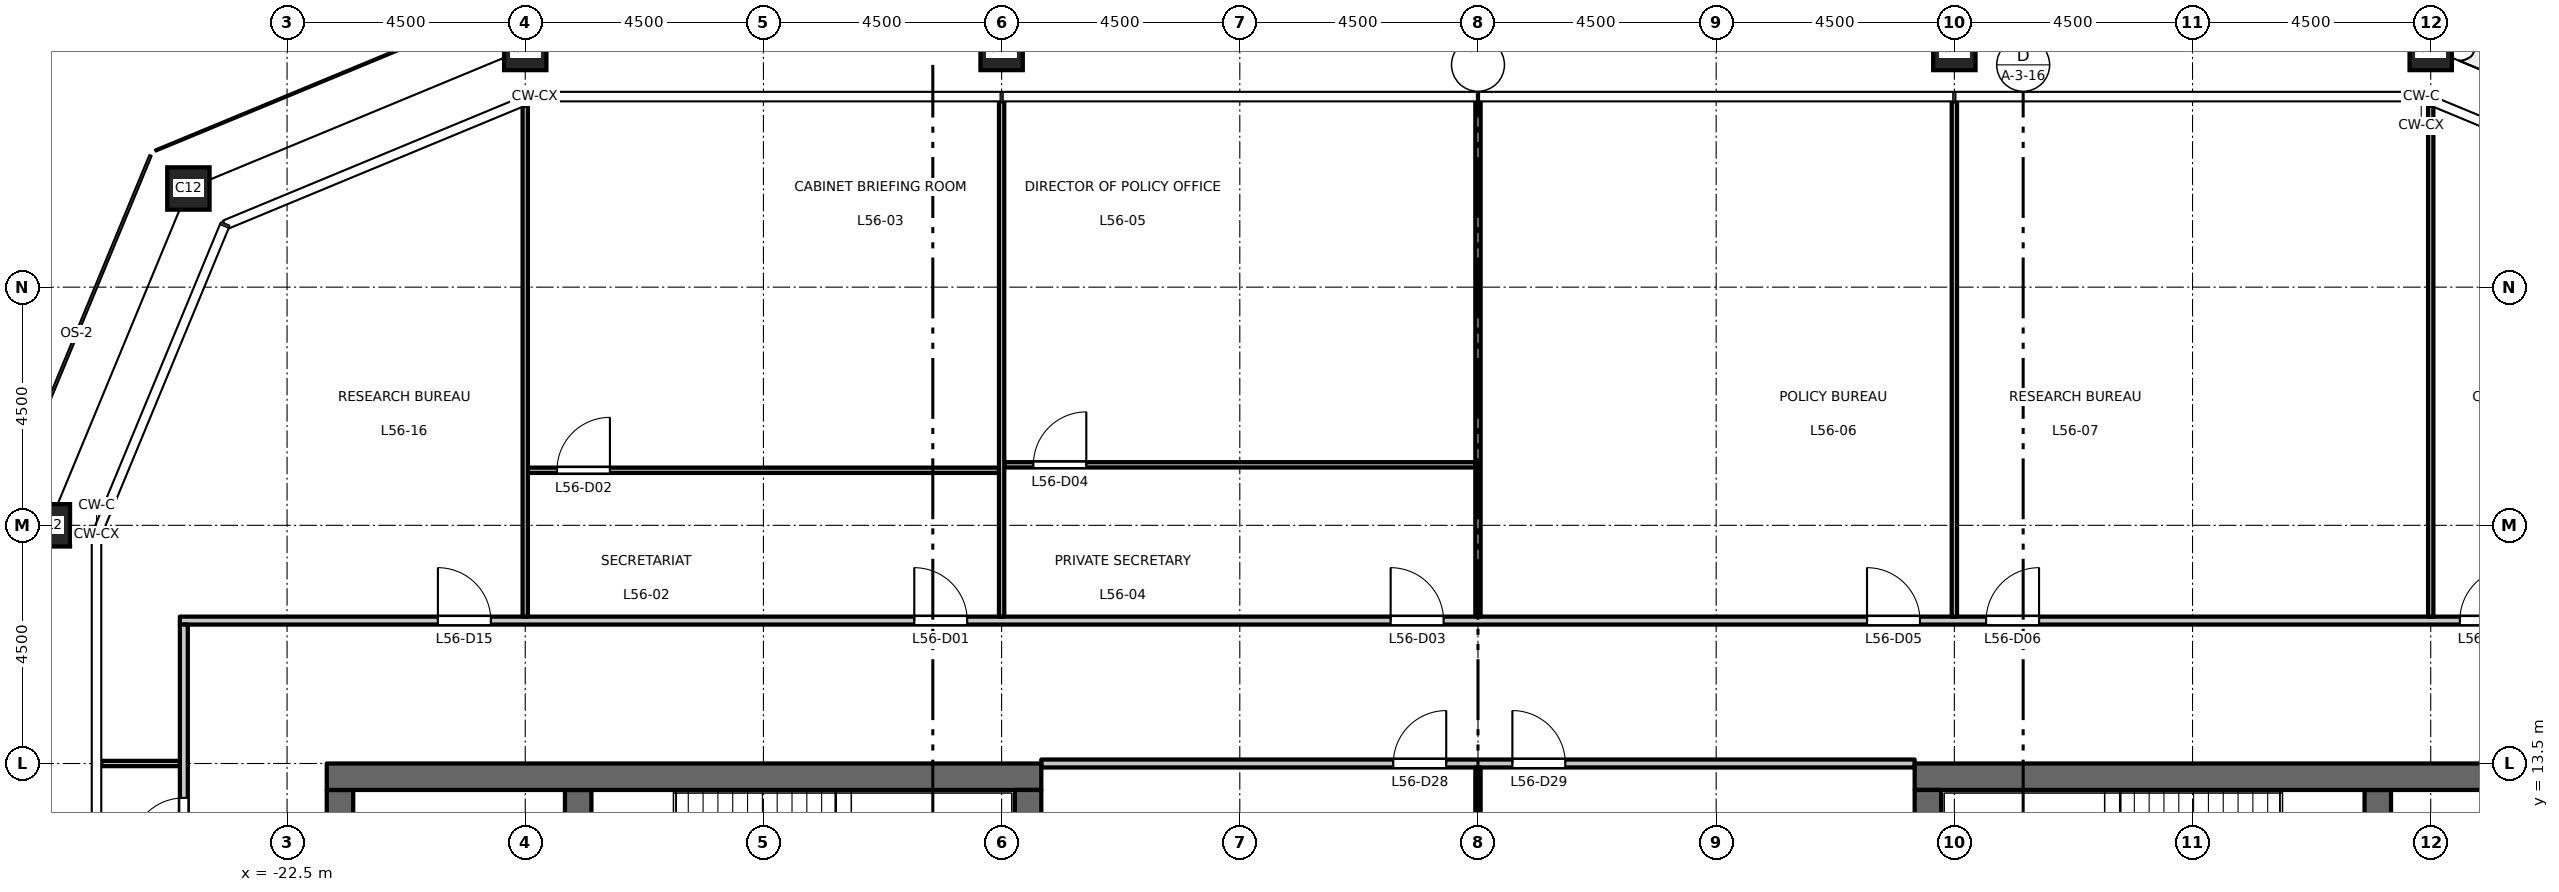
"""IFC4 building model, lengths in metres.
Left out: names, types, materials, properties, quantities, classifications, styles, units other than length and angle.
Written with IfcOpenShell. Run it as: python <this file> out.ifc"""

import sys

from ifc_helpers import new_model, si_unit, direction, frame, frame_2d, origin, origin_2d, place, context, subcontext, project, spatial, rectangle, hollow_rectangle, extrude, element, fill, save


model = new_model("IFC4")
c1 = context("Model", 3, precision=1e-05, world=origin(), true_north=direction((0.0, 1.0)))
c2 = subcontext(c1, "Body", "Model", "MODEL_VIEW")
j1 = project(units=[si_unit("LENGTHUNIT", "METRE"), si_unit("PLANEANGLEUNIT", "RADIAN")], contexts=[c1])
p1 = place(None, origin())
s1 = spatial("IfcSite", under=j1, at=p1, CompositionType="ELEMENT")
p2 = place(p1, origin())
s2 = spatial("IfcBuilding", under=s1, at=p2, CompositionType="ELEMENT")
p3 = place(p2, frame((0.0, 0.0, 260.2)))
s3 = spatial("IfcBuildingStorey", under=s2, at=p3, CompositionType="ELEMENT", Elevation=260.2)
for number, where, z_axis, x_axis in (
    (1, (18.0, 27.0, 0.0), (0.0, 0.0, 1.0), (1.0, 0.0, 0.0)),
    (2, (9.0, 27.0, 0.0), (0.0, 0.0, 1.0), (1.0, 0.0, 0.0)),
    (3, (0.0, 27.0, 0.0), (0.0, 0.0, 1.0), (1.0, 0.0, 0.0)),
    (4, (-9.0, 27.0, 0.0), (0.0, 0.0, 1.0), (1.0, 0.0, 0.0)),
    (5, (-18.0, 27.0, 0.0), (0.0, 0.0, 1.0), (1.0, 0.0, 0.0)),
    (6, (-24.364, 24.364, 0.0), (0.0, 0.0, 1.0), (1.0, 0.0, 0.0)),
    (7, (-27.0, 18.0, 0.0), (0.0, 0.0, 1.0), (1.0, 0.0, 0.0)),
):
    element("IfcColumn", number, at=place(p3, frame(where, z_axis=z_axis, x_axis=x_axis)), inside=s3, PredefinedType="COLUMN", context=c2, shape_type="SweptSolid", body=[
        extrude(hollow_rectangle(XDim=0.8, YDim=0.8, WallThickness=0.045, at=origin_2d()), origin(), (0.0, 0.0, 1.0), 4.5),
    ])
p4 = place(p3, frame((-21.5, -13.0, 0.0), z_axis=(0.0, 0.0, 1.0), x_axis=(0.0, 1.0, 0.0)))
e8 = element("IfcWall", 8, at=p4, inside=s3, PredefinedType="SHEAR", context=c2, shape_type="SweptSolid", body=[
    extrude(rectangle(XDim=26.0, YDim=0.5, at=frame_2d((13.0, 0.0))), origin(), (0.0, 0.0, 1.0), 4.35),
])
p5 = place(p4, frame((16.825, 0.0, 0.0)))
e9 = element("IfcOpeningElement", 9, at=p5, cuts=e8, PredefinedType="OPENING", context=c2, shape_type="SweptSolid", body=[
    extrude(rectangle(XDim=1.8, YDim=2.1, at=frame_2d((0.9, 1.05))), frame((0.0, 0.26, 0.0), z_axis=(0.0, -1.0, 0.0), x_axis=(1.0, 0.0, 0.0)), (0.0, 0.0, 1.0), 0.52),
])
p6 = place(p4, frame((7.375, 0.0, 0.0)))
e10 = element("IfcOpeningElement", 10, at=p6, cuts=e8, PredefinedType="OPENING", context=c2, shape_type="SweptSolid", body=[
    extrude(rectangle(XDim=1.8, YDim=2.1, at=frame_2d((0.9, 1.05))), frame((0.0, 0.26, 0.0), z_axis=(0.0, -1.0, 0.0), x_axis=(1.0, 0.0, 0.0)), (0.0, 0.0, 1.0), 0.52),
])
p7 = place(p3, frame((-17.0, 6.425, 0.0), z_axis=(0.0, 0.0, 1.0), x_axis=(0.0, 1.0, 0.0)))
e11 = element("IfcWall", 11, at=p7, inside=s3, PredefinedType="SHEAR", context=c2, shape_type="SweptSolid", body=[
    extrude(rectangle(XDim=6.575, YDim=0.5, at=frame_2d((3.288, 0.0))), origin(), (0.0, 0.0, 1.0), 4.35),
])
p8 = place(p3, frame((-8.25, 13.25, 0.0), z_axis=(0.0, 0.0, 1.0), x_axis=(-1.0, 0.0, 0.0)))
e12 = element("IfcWall", 12, at=p8, inside=s3, PredefinedType="SHEAR", context=c2, shape_type="SweptSolid", body=[
    extrude(rectangle(XDim=13.5, YDim=0.5, at=frame_2d((6.75, 0.0))), origin(), (0.0, 0.0, 1.0), 4.35),
])
p9 = place(p3, frame((-8.5, -13.0, 0.0), z_axis=(0.0, 0.0, 1.0), x_axis=(0.0, 1.0, 0.0)))
e13 = element("IfcWall", 13, at=p9, inside=s3, PredefinedType="SHEAR", context=c2, shape_type="SweptSolid", body=[
    extrude(rectangle(XDim=26.0, YDim=0.5, at=frame_2d((13.0, 0.0))), origin(), (0.0, 0.0, 1.0), 4.35),
])
p10 = place(p3, frame((17.0, 6.425, 0.0), z_axis=(0.0, 0.0, 1.0), x_axis=(0.0, 1.0, 0.0)))
e14 = element("IfcWall", 14, at=p10, inside=s3, PredefinedType="SHEAR", context=c2, shape_type="SweptSolid", body=[
    extrude(rectangle(XDim=6.575, YDim=0.5, at=frame_2d((3.288, 0.0))), origin(), (0.0, 0.0, 1.0), 4.35),
])
p11 = place(p3, frame((8.25, 13.25, 0.0), z_axis=(0.0, 0.0, 1.0), x_axis=(1.0, 0.0, 0.0)))
e15 = element("IfcWall", 15, at=p11, inside=s3, PredefinedType="SHEAR", context=c2, shape_type="SweptSolid", body=[
    extrude(rectangle(XDim=13.5, YDim=0.5, at=frame_2d((6.75, 0.0))), origin(), (0.0, 0.0, 1.0), 4.35),
])
p12 = place(p3, frame((8.5, -13.0, 0.0), z_axis=(0.0, 0.0, 1.0), x_axis=(0.0, 1.0, 0.0)))
e16 = element("IfcWall", 16, at=p12, inside=s3, PredefinedType="SHEAR", context=c2, shape_type="SweptSolid", body=[
    extrude(rectangle(XDim=26.0, YDim=0.5, at=frame_2d((13.0, 0.0))), origin(), (0.0, 0.0, 1.0), 4.35),
])
p13 = place(p3, frame((-26.01, 13.5, 0.0), z_axis=(0.0, 0.0, 1.0), x_axis=(1.0, 0.0, 0.0)))
e17 = element("IfcWall", 17, at=p13, inside=s3, PredefinedType="PARTITIONING", context=c2, shape_type="SweptSolid", body=[
    extrude(rectangle(XDim=1.485, YDim=0.1, at=frame_2d((0.743, 0.0))), origin(), (0.0, 0.0, 1.0), 4.35),
])
p14 = place(p3, frame((-8.25, 13.5, 0.0), z_axis=(0.0, 0.0, 1.0), x_axis=(1.0, 0.0, 0.0)))
e18 = element("IfcWall", 18, at=p14, inside=s3, PredefinedType="PARTITIONING", context=c2, shape_type="SweptSolid", body=[
    extrude(rectangle(XDim=16.5, YDim=0.15, at=frame_2d((8.25, 0.0))), origin(), (0.0, 0.0, 1.0), 4.35),
])
p15 = place(p14, frame((6.65, 0.0, 0.0)))
e19 = element("IfcOpeningElement", 19, at=p15, cuts=e18, PredefinedType="OPENING", context=c2, shape_type="SweptSolid", body=[
    extrude(rectangle(XDim=1.0, YDim=2.1, at=frame_2d((0.5, 1.05))), frame((0.0, 0.085, 0.0), z_axis=(0.0, -1.0, 0.0), x_axis=(1.0, 0.0, 0.0)), (0.0, 0.0, 1.0), 0.17),
])
p16 = place(p14, frame((8.9, 0.0, 0.0)))
e20 = element("IfcOpeningElement", 20, at=p16, cuts=e18, PredefinedType="OPENING", context=c2, shape_type="SweptSolid", body=[
    extrude(rectangle(XDim=1.0, YDim=2.1, at=frame_2d((0.5, 1.05))), frame((0.0, 0.085, 0.0), z_axis=(0.0, -1.0, 0.0), x_axis=(1.0, 0.0, 0.0)), (0.0, 0.0, 1.0), 0.17),
])
p17 = place(p3, frame((-24.525, 16.2, 0.0), z_axis=(0.0, 0.0, 1.0), x_axis=(1.0, 0.0, 0.0)))
e21 = element("IfcWall", 21, at=p17, inside=s3, PredefinedType="PARTITIONING", context=c2, shape_type="SweptSolid", body=[
    extrude(rectangle(XDim=49.05, YDim=0.15, at=frame_2d((24.525, 0.0))), origin(), (0.0, 0.0, 1.0), 4.35),
])
p18 = place(p17, frame((13.875, 0.0, 0.0)))
e22 = element("IfcOpeningElement", 22, at=p18, cuts=e21, PredefinedType="OPENING", context=c2, shape_type="SweptSolid", body=[
    extrude(rectangle(XDim=1.0, YDim=2.1, at=frame_2d((0.5, 1.05))), frame((0.0, 0.085, 0.0), z_axis=(0.0, -1.0, 0.0), x_axis=(1.0, 0.0, 0.0)), (0.0, 0.0, 1.0), 0.17),
])
p19 = place(p17, frame((22.875, 0.0, 0.0)))
e23 = element("IfcOpeningElement", 23, at=p19, cuts=e21, PredefinedType="OPENING", context=c2, shape_type="SweptSolid", body=[
    extrude(rectangle(XDim=1.0, YDim=2.1, at=frame_2d((0.5, 1.05))), frame((0.0, 0.085, 0.0), z_axis=(0.0, -1.0, 0.0), x_axis=(1.0, 0.0, 0.0)), (0.0, 0.0, 1.0), 0.17),
])
p20 = place(p17, frame((31.875, 0.0, 0.0)))
e24 = element("IfcOpeningElement", 24, at=p20, cuts=e21, PredefinedType="OPENING", context=c2, shape_type="SweptSolid", body=[
    extrude(rectangle(XDim=1.0, YDim=2.1, at=frame_2d((0.5, 1.05))), frame((0.0, 0.085, 0.0), z_axis=(0.0, -1.0, 0.0), x_axis=(1.0, 0.0, 0.0)), (0.0, 0.0, 1.0), 0.17),
])
p21 = place(p17, frame((34.125, 0.0, 0.0)))
e25 = element("IfcOpeningElement", 25, at=p21, cuts=e21, PredefinedType="OPENING", context=c2, shape_type="SweptSolid", body=[
    extrude(rectangle(XDim=1.0, YDim=2.1, at=frame_2d((0.5, 1.05))), frame((0.0, 0.085, 0.0), z_axis=(0.0, -1.0, 0.0), x_axis=(1.0, 0.0, 0.0)), (0.0, 0.0, 1.0), 0.17),
])
p22 = place(p17, frame((4.875, 0.0, 0.0)))
e26 = element("IfcOpeningElement", 26, at=p22, cuts=e21, PredefinedType="OPENING", context=c2, shape_type="SweptSolid", body=[
    extrude(rectangle(XDim=1.0, YDim=2.1, at=frame_2d((0.5, 1.05))), frame((0.0, 0.085, 0.0), z_axis=(0.0, -1.0, 0.0), x_axis=(1.0, 0.0, 0.0)), (0.0, 0.0, 1.0), 0.17),
])
p23 = place(p17, frame((43.075, 0.0, 0.0)))
e27 = element("IfcOpeningElement", 27, at=p23, cuts=e21, PredefinedType="OPENING", context=c2, shape_type="SweptSolid", body=[
    extrude(rectangle(XDim=1.0, YDim=2.1, at=frame_2d((0.5, 1.05))), frame((0.0, 0.085, 0.0), z_axis=(0.0, -1.0, 0.0), x_axis=(1.0, 0.0, 0.0)), (0.0, 0.0, 1.0), 0.17),
])
p24 = place(p3, frame((-17.95, 19.04, 0.0), z_axis=(0.0, 0.0, 1.0), x_axis=(1.0, 0.0, 0.0)))
e28 = element("IfcWall", 28, at=p24, inside=s3, PredefinedType="PARTITIONING", context=c2, shape_type="SweptSolid", body=[
    extrude(rectangle(XDim=8.9, YDim=0.1, at=frame_2d((4.45, 0.0))), origin(), (0.0, 0.0, 1.0), 4.35),
])
p25 = place(p24, frame((0.55, 0.0, 0.0)))
e29 = element("IfcOpeningElement", 29, at=p25, cuts=e28, PredefinedType="OPENING", context=c2, shape_type="SweptSolid", body=[
    extrude(rectangle(XDim=1.0, YDim=2.1, at=frame_2d((0.5, 1.05))), frame((0.0, 0.06, 0.0), z_axis=(0.0, -1.0, 0.0), x_axis=(1.0, 0.0, 0.0)), (0.0, 0.0, 1.0), 0.12),
])
p26 = place(p3, frame((-8.95, 19.143, 0.0), z_axis=(0.0, 0.0, 1.0), x_axis=(1.0, 0.0, 0.0)))
e30 = element("IfcWall", 30, at=p26, inside=s3, PredefinedType="PARTITIONING", context=c2, shape_type="SweptSolid", body=[
    extrude(rectangle(XDim=8.9, YDim=0.1, at=frame_2d((4.45, 0.0))), origin(), (0.0, 0.0, 1.0), 4.35),
])
p27 = place(p26, frame((0.55, 0.0, 0.0)))
e31 = element("IfcOpeningElement", 31, at=p27, cuts=e30, PredefinedType="OPENING", context=c2, shape_type="SweptSolid", body=[
    extrude(rectangle(XDim=1.0, YDim=2.1, at=frame_2d((0.5, 1.05))), frame((0.0, 0.06, 0.0), z_axis=(0.0, -1.0, 0.0), x_axis=(1.0, 0.0, 0.0)), (0.0, 0.0, 1.0), 0.12),
])
p28 = place(p3, frame((-24.45, -16.125, 0.0), z_axis=(0.0, 0.0, 1.0), x_axis=(0.0, 1.0, 0.0)))
e32 = element("IfcWall", 32, at=p28, inside=s3, PredefinedType="PARTITIONING", context=c2, shape_type="SweptSolid", body=[
    extrude(rectangle(XDim=32.25, YDim=0.15, at=frame_2d((16.125, 0.0))), origin(), (0.0, 0.0, 1.0), 4.35),
])
p29 = place(p28, frame((3.225, 0.0, 0.0)))
e33 = element("IfcOpeningElement", 33, at=p29, cuts=e32, PredefinedType="OPENING", context=c2, shape_type="SweptSolid", body=[
    extrude(rectangle(XDim=1.0, YDim=2.1, at=frame_2d((0.5, 1.05))), frame((0.0, 0.085, 0.0), z_axis=(0.0, -1.0, 0.0), x_axis=(1.0, 0.0, 0.0)), (0.0, 0.0, 1.0), 0.17),
])
p30 = place(p28, frame((14.475, 0.0, 0.0)))
e34 = element("IfcOpeningElement", 34, at=p30, cuts=e32, PredefinedType="OPENING", context=c2, shape_type="SweptSolid", body=[
    extrude(rectangle(XDim=1.0, YDim=2.1, at=frame_2d((0.5, 1.05))), frame((0.0, 0.085, 0.0), z_axis=(0.0, -1.0, 0.0), x_axis=(1.0, 0.0, 0.0)), (0.0, 0.0, 1.0), 0.17),
])
p31 = place(p28, frame((16.725, 0.0, 0.0)))
e35 = element("IfcOpeningElement", 35, at=p31, cuts=e32, PredefinedType="OPENING", context=c2, shape_type="SweptSolid", body=[
    extrude(rectangle(XDim=1.0, YDim=2.1, at=frame_2d((0.5, 1.05))), frame((0.0, 0.085, 0.0), z_axis=(0.0, -1.0, 0.0), x_axis=(1.0, 0.0, 0.0)), (0.0, 0.0, 1.0), 0.17),
])
p32 = place(p28, frame((27.975, 0.0, 0.0)))
e36 = element("IfcOpeningElement", 36, at=p32, cuts=e32, PredefinedType="OPENING", context=c2, shape_type="SweptSolid", body=[
    extrude(rectangle(XDim=1.0, YDim=2.1, at=frame_2d((0.5, 1.05))), frame((0.0, 0.085, 0.0), z_axis=(0.0, -1.0, 0.0), x_axis=(1.0, 0.0, 0.0)), (0.0, 0.0, 1.0), 0.17),
])
p33 = place(p3, frame((-18.0, 16.275, 0.0), z_axis=(0.0, 0.0, 1.0), x_axis=(0.0, 1.0, 0.0)))
e37 = element("IfcWall", 37, at=p33, inside=s3, PredefinedType="PARTITIONING", context=c2, shape_type="SweptSolid", body=[
    extrude(rectangle(XDim=9.653, YDim=0.1, at=frame_2d((4.827, 0.0))), origin(), (0.0, 0.0, 1.0), 3.65),
])
p34 = place(p3, frame((-9.0, 16.275, 0.0), z_axis=(0.0, 0.0, 1.0), x_axis=(0.0, 1.0, 0.0)))
e38 = element("IfcWall", 38, at=p34, inside=s3, PredefinedType="PARTITIONING", context=c2, shape_type="SweptSolid", body=[
    extrude(rectangle(XDim=9.735, YDim=0.1, at=frame_2d((4.868, 0.0))), origin(), (0.0, 0.0, 1.0), 3.65),
])
p35 = place(p3, frame((0.0, 8.6, 0.0), z_axis=(0.0, 0.0, 1.0), x_axis=(0.0, 1.0, 0.0)))
e39 = element("IfcWall", 39, at=p35, inside=s3, PredefinedType="PARTITIONING", context=c2, shape_type="SweptSolid", body=[
    extrude(rectangle(XDim=4.825, YDim=0.1, at=frame_2d((2.413, 0.0))), origin(), (0.0, 0.0, 1.0), 3.55),
])
p36 = place(p3, frame((0.0, 16.275, 0.0), z_axis=(0.0, 0.0, 1.0), x_axis=(0.0, 1.0, 0.0)))
e40 = element("IfcWall", 40, at=p36, inside=s3, PredefinedType="PARTITIONING", context=c2, shape_type="SweptSolid", body=[
    extrude(rectangle(XDim=9.735, YDim=0.1, at=frame_2d((4.868, 0.0))), origin(), (0.0, 0.0, 1.0), 3.55),
])
p37 = place(p3, frame((9.0, 16.275, 0.0), z_axis=(0.0, 0.0, 1.0), x_axis=(0.0, 1.0, 0.0)))
e41 = element("IfcWall", 41, at=p37, inside=s3, PredefinedType="PARTITIONING", context=c2, shape_type="SweptSolid", body=[
    extrude(rectangle(XDim=9.735, YDim=0.1, at=frame_2d((4.868, 0.0))), origin(), (0.0, 0.0, 1.0), 3.65),
])
p38 = place(p3, frame((18.0, 16.275, 0.0), z_axis=(0.0, 0.0, 1.0), x_axis=(0.0, 1.0, 0.0)))
e42 = element("IfcWall", 42, at=p38, inside=s3, PredefinedType="PARTITIONING", context=c2, shape_type="SweptSolid", body=[
    extrude(rectangle(XDim=9.653, YDim=0.1, at=frame_2d((4.827, 0.0))), origin(), (0.0, 0.0, 1.0), 3.65),
])
p39 = place(p18, origin())
e43 = element("IfcDoor", 43, at=p39, inside=s3, OperationType="SINGLE_SWING_LEFT", PredefinedType="DOOR", context=c2, shape_type="SweptSolid", body=[
    extrude(rectangle(XDim=1.0, YDim=2.1, at=frame_2d((0.5, 1.05))), frame((0.0, 0.025, 0.0), z_axis=(0.0, -1.0, 0.0), x_axis=(1.0, 0.0, 0.0)), (0.0, 0.0, 1.0), 0.05),
])
fill(e22, e43)
p40 = place(p25, origin())
e44 = element("IfcDoor", 44, at=p40, inside=s3, OperationType="SINGLE_SWING_RIGHT", PredefinedType="DOOR", context=c2, shape_type="SweptSolid", body=[
    extrude(rectangle(XDim=1.0, YDim=2.1, at=frame_2d((0.5, 1.05))), frame((0.0, 0.025, 0.0), z_axis=(0.0, -1.0, 0.0), x_axis=(1.0, 0.0, 0.0)), (0.0, 0.0, 1.0), 0.05),
])
fill(e29, e44)
p41 = place(p19, origin())
e45 = element("IfcDoor", 45, at=p41, inside=s3, OperationType="SINGLE_SWING_LEFT", PredefinedType="DOOR", context=c2, shape_type="SweptSolid", body=[
    extrude(rectangle(XDim=1.0, YDim=2.1, at=frame_2d((0.5, 1.05))), frame((0.0, 0.025, 0.0), z_axis=(0.0, -1.0, 0.0), x_axis=(1.0, 0.0, 0.0)), (0.0, 0.0, 1.0), 0.05),
])
fill(e23, e45)
p42 = place(p27, origin())
e46 = element("IfcDoor", 46, at=p42, inside=s3, OperationType="SINGLE_SWING_RIGHT", PredefinedType="DOOR", context=c2, shape_type="SweptSolid", body=[
    extrude(rectangle(XDim=1.0, YDim=2.1, at=frame_2d((0.5, 1.05))), frame((0.0, 0.025, 0.0), z_axis=(0.0, -1.0, 0.0), x_axis=(1.0, 0.0, 0.0)), (0.0, 0.0, 1.0), 0.05),
])
fill(e31, e46)
p43 = place(p20, origin())
e47 = element("IfcDoor", 47, at=p43, inside=s3, OperationType="SINGLE_SWING_LEFT", PredefinedType="DOOR", context=c2, shape_type="SweptSolid", body=[
    extrude(rectangle(XDim=1.0, YDim=2.1, at=frame_2d((0.5, 1.05))), frame((0.0, 0.025, 0.0), z_axis=(0.0, -1.0, 0.0), x_axis=(1.0, 0.0, 0.0)), (0.0, 0.0, 1.0), 0.05),
])
fill(e24, e47)
p44 = place(p21, origin())
e48 = element("IfcDoor", 48, at=p44, inside=s3, OperationType="SINGLE_SWING_RIGHT", PredefinedType="DOOR", context=c2, shape_type="SweptSolid", body=[
    extrude(rectangle(XDim=1.0, YDim=2.1, at=frame_2d((0.5, 1.05))), frame((0.0, 0.025, 0.0), z_axis=(0.0, -1.0, 0.0), x_axis=(1.0, 0.0, 0.0)), (0.0, 0.0, 1.0), 0.05),
])
fill(e25, e48)
p45 = place(p22, origin())
e49 = element("IfcDoor", 49, at=p45, inside=s3, OperationType="SINGLE_SWING_LEFT", PredefinedType="DOOR", context=c2, shape_type="SweptSolid", body=[
    extrude(rectangle(XDim=1.0, YDim=2.1, at=frame_2d((0.5, 1.05))), frame((0.0, 0.025, 0.0), z_axis=(0.0, -1.0, 0.0), x_axis=(1.0, 0.0, 0.0)), (0.0, 0.0, 1.0), 0.05),
])
fill(e26, e49)
p46 = place(p23, origin())
e50 = element("IfcDoor", 50, at=p46, inside=s3, OperationType="SINGLE_SWING_RIGHT", PredefinedType="DOOR", context=c2, shape_type="SweptSolid", body=[
    extrude(rectangle(XDim=1.0, YDim=2.1, at=frame_2d((0.5, 1.05))), frame((0.0, 0.025, 0.0), z_axis=(0.0, -1.0, 0.0), x_axis=(1.0, 0.0, 0.0)), (0.0, 0.0, 1.0), 0.05),
])
fill(e27, e50)
p47 = place(p32, origin())
e51 = element("IfcDoor", 51, at=p47, inside=s3, OperationType="SINGLE_SWING_LEFT", PredefinedType="DOOR", context=c2, shape_type="SweptSolid", body=[
    extrude(rectangle(XDim=1.0, YDim=2.1, at=frame_2d((0.5, 1.05))), frame((0.0, 0.025, 0.0), z_axis=(0.0, -1.0, 0.0), x_axis=(1.0, 0.0, 0.0)), (0.0, 0.0, 1.0), 0.05),
])
fill(e36, e51)
p48 = place(p15, origin())
e52 = element("IfcDoor", 52, at=p48, inside=s3, OperationType="SINGLE_SWING_RIGHT", PredefinedType="DOOR", context=c2, shape_type="SweptSolid", body=[
    extrude(rectangle(XDim=1.0, YDim=2.1, at=frame_2d((0.5, 1.05))), frame((0.0, 0.025, 0.0), z_axis=(0.0, -1.0, 0.0), x_axis=(1.0, 0.0, 0.0)), (0.0, 0.0, 1.0), 0.05),
])
fill(e19, e52)
p49 = place(p16, origin())
e53 = element("IfcDoor", 53, at=p49, inside=s3, OperationType="SINGLE_SWING_LEFT", PredefinedType="DOOR", context=c2, shape_type="SweptSolid", body=[
    extrude(rectangle(XDim=1.0, YDim=2.1, at=frame_2d((0.5, 1.05))), frame((0.0, 0.025, 0.0), z_axis=(0.0, -1.0, 0.0), x_axis=(1.0, 0.0, 0.0)), (0.0, 0.0, 1.0), 0.05),
])
fill(e20, e53)
save(model, sys.argv[1])
